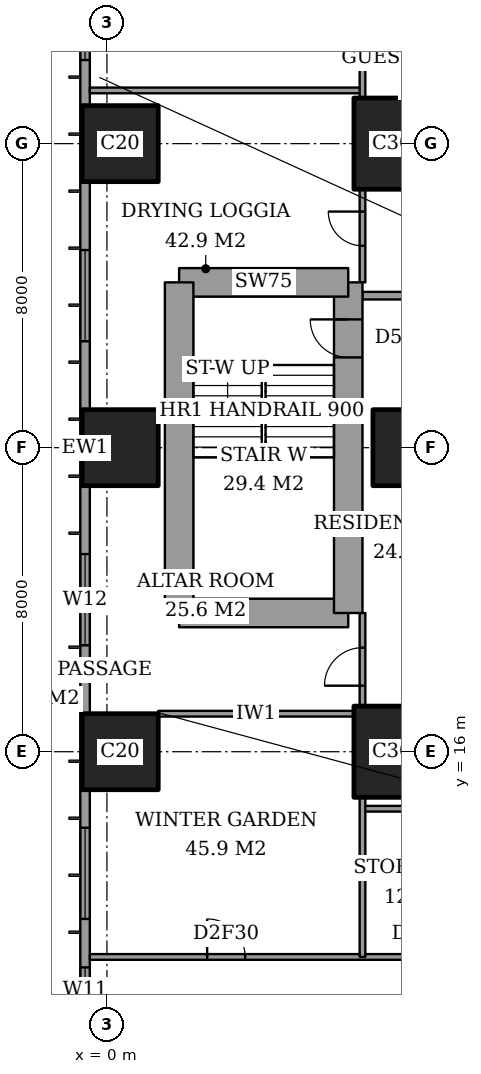
"""IFC4 building model, lengths in metres.
Left out: names, types, materials, properties, quantities, classifications, styles, units other than length and angle.
Written with IfcOpenShell. Run it as: python <this file> out.ifc"""

import sys

from ifc_helpers import new_model, si_unit, direction, frame, frame_2d, origin, origin_2d, place, context, subcontext, project, spatial, rectangle, extrude, element, fill, save


model = new_model("IFC4")
c1 = context("Model", 3, precision=1e-05, world=origin(), true_north=direction((0.0, 1.0)))
c2 = subcontext(c1, "Body", "Model", "MODEL_VIEW")
j1 = project(units=[si_unit("LENGTHUNIT", "METRE"), si_unit("PLANEANGLEUNIT", "RADIAN")], contexts=[c1])
p1 = place(None, origin())
s1 = spatial("IfcSite", under=j1, at=p1, CompositionType="ELEMENT")
p2 = place(p1, origin())
s2 = spatial("IfcBuilding", under=s1, at=p2, CompositionType="ELEMENT")
p3 = place(p2, frame((0.0, 0.0, 121.4)))
s3 = spatial("IfcBuildingStorey", under=s2, at=p3, CompositionType="ELEMENT", Elevation=121.4)
for number, where, z_axis, x_axis in (
    (1, (0.35, 16.0, 0.0), (0.0, 0.0, 1.0), (1.0, 0.0, 0.0)),
    (2, (0.35, 24.0, 0.0), (0.0, 0.0, 1.0), (1.0, 0.0, 0.0)),
    (3, (0.35, 32.0, 0.0), (0.0, 0.0, 1.0), (1.0, 0.0, 0.0)),
):
    element("IfcColumn", number, at=place(p3, frame(where, z_axis=z_axis, x_axis=x_axis)), inside=s3, PredefinedType="COLUMN", context=c2, shape_type="SweptSolid", body=[
        extrude(rectangle(XDim=2.0, YDim=2.0, at=origin_2d()), origin(), (0.0, 0.0, 1.0), 3.6),
    ])
p4 = place(p3, frame((8.0, 16.0, 0.0), z_axis=(0.0, 0.0, 1.0), x_axis=(1.0, 0.0, 0.0)))
e4 = element("IfcColumn", 4, at=p4, inside=s3, PredefinedType="COLUMN", context=c2, shape_type="SweptSolid", body=[
    extrude(rectangle(XDim=3.0, YDim=2.4, at=origin_2d()), origin(), (0.0, 0.0, 1.0), 3.6),
])
p5 = place(p3, frame((8.0, 24.0, 0.0), z_axis=(0.0, 0.0, 1.0), x_axis=(1.0, 0.0, 0.0)))
e5 = element("IfcColumn", 5, at=p5, inside=s3, PredefinedType="COLUMN", context=c2, shape_type="SweptSolid", body=[
    extrude(rectangle(XDim=2.0, YDim=2.0, at=origin_2d()), origin(), (0.0, 0.0, 1.0), 3.6),
])
p6 = place(p3, frame((8.0, 32.0, 0.0), z_axis=(0.0, 0.0, 1.0), x_axis=(1.0, 0.0, 0.0)))
e6 = element("IfcColumn", 6, at=p6, inside=s3, PredefinedType="COLUMN", context=c2, shape_type="SweptSolid", body=[
    extrude(rectangle(XDim=3.0, YDim=2.4, at=origin_2d()), origin(), (0.0, 0.0, 1.0), 3.6),
])
p7 = place(p3, frame((1.9, 19.65, 0.0), z_axis=(0.0, 0.0, 1.0), x_axis=(1.0, 0.0, 0.0)))
e7 = element("IfcWall", 7, at=p7, inside=s3, PredefinedType="SHEAR", context=c2, shape_type="SweptSolid", body=[
    extrude(rectangle(XDim=4.45, YDim=0.75, at=frame_2d((2.225, 0.0))), origin(), (0.0, 0.0, 1.0), 3.6),
])
p8 = place(p3, frame((6.35, 19.65, 0.0), z_axis=(0.0, 0.0, 1.0), x_axis=(0.0, 1.0, 0.0)))
e8 = element("IfcWall", 8, at=p8, inside=s3, PredefinedType="SHEAR", context=c2, shape_type="SweptSolid", body=[
    extrude(rectangle(XDim=8.7, YDim=0.75, at=frame_2d((4.35, 0.0))), origin(), (0.0, 0.0, 1.0), 3.6),
])
p9 = place(p8, frame((6.725, 0.0, 0.0)))
e9 = element("IfcOpeningElement", 9, at=p9, cuts=e8, PredefinedType="OPENING", context=c2, shape_type="SweptSolid", body=[
    extrude(rectangle(XDim=1.0, YDim=2.1, at=frame_2d((0.5, 1.05))), frame((0.0, 0.385, 0.0), z_axis=(0.0, -1.0, 0.0), x_axis=(1.0, 0.0, 0.0)), (0.0, 0.0, 1.0), 0.77),
])
p10 = place(p3, frame((6.35, 28.35, 0.0), z_axis=(0.0, 0.0, 1.0), x_axis=(-1.0, 0.0, 0.0)))
e10 = element("IfcWall", 10, at=p10, inside=s3, PredefinedType="SHEAR", context=c2, shape_type="SweptSolid", body=[
    extrude(rectangle(XDim=4.45, YDim=0.75, at=frame_2d((2.225, 0.0))), origin(), (0.0, 0.0, 1.0), 3.6),
])
p11 = place(p3, frame((1.9, 28.35, 0.0), z_axis=(0.0, 0.0, 1.0), x_axis=(0.0, -1.0, 0.0)))
e11 = element("IfcWall", 11, at=p11, inside=s3, PredefinedType="SHEAR", context=c2, shape_type="SweptSolid", body=[
    extrude(rectangle(XDim=8.7, YDim=0.75, at=frame_2d((4.35, 0.0))), origin(), (0.0, 0.0, 1.0), 3.6),
])
p12 = place(p3, frame((-0.575, 44.825, 0.0), z_axis=(0.0, 0.0, 1.0), x_axis=(0.0, -1.0, 0.0)))
e12 = element("IfcWall", 12, at=p12, inside=s3, PredefinedType="SOLIDWALL", context=c2, shape_type="SweptSolid", body=[
    extrude(rectangle(XDim=41.65, YDim=0.25, at=frame_2d((20.825, 0.0))), origin(), (0.0, 0.0, 1.0), 3.6),
])
p13 = place(p12, frame((0.775, 0.0, 0.4)))
e13 = element("IfcOpeningElement", 13, at=p13, cuts=e12, PredefinedType="OPENING", context=c2, shape_type="SweptSolid", body=[
    extrude(rectangle(XDim=2.4, YDim=2.2, at=frame_2d((1.2, 1.1))), frame((0.0, 0.135, 0.0), z_axis=(0.0, -1.0, 0.0), x_axis=(1.0, 0.0, 0.0)), (0.0, 0.0, 1.0), 0.27),
])
p14 = place(p12, frame((6.1, 0.0, 0.4)))
e14 = element("IfcOpeningElement", 14, at=p14, cuts=e12, PredefinedType="OPENING", context=c2, shape_type="SweptSolid", body=[
    extrude(rectangle(XDim=1.2, YDim=2.2, at=frame_2d((0.6, 1.1))), frame((0.0, 0.135, 0.0), z_axis=(0.0, -1.0, 0.0), x_axis=(1.0, 0.0, 0.0)), (0.0, 0.0, 1.0), 0.27),
])
p15 = place(p12, frame((8.225, 0.0, 0.4)))
e15 = element("IfcOpeningElement", 15, at=p15, cuts=e12, PredefinedType="OPENING", context=c2, shape_type="SweptSolid", body=[
    extrude(rectangle(XDim=2.4, YDim=2.2, at=frame_2d((1.2, 1.1))), frame((0.0, 0.135, 0.0), z_axis=(0.0, -1.0, 0.0), x_axis=(1.0, 0.0, 0.0)), (0.0, 0.0, 1.0), 0.27),
])
p16 = place(p12, frame((15.625, 0.0, 0.4)))
e16 = element("IfcOpeningElement", 16, at=p16, cuts=e12, PredefinedType="OPENING", context=c2, shape_type="SweptSolid", body=[
    extrude(rectangle(XDim=2.4, YDim=2.2, at=frame_2d((1.2, 1.1))), frame((0.0, 0.135, 0.0), z_axis=(0.0, -1.0, 0.0), x_axis=(1.0, 0.0, 0.0)), (0.0, 0.0, 1.0), 0.27),
])
p17 = place(p12, frame((23.625, 0.0, 0.4)))
e17 = element("IfcOpeningElement", 17, at=p17, cuts=e12, PredefinedType="OPENING", context=c2, shape_type="SweptSolid", body=[
    extrude(rectangle(XDim=2.4, YDim=2.2, at=frame_2d((1.2, 1.1))), frame((0.0, 0.135, 0.0), z_axis=(0.0, -1.0, 0.0), x_axis=(1.0, 0.0, 0.0)), (0.0, 0.0, 1.0), 0.27),
])
p18 = place(p12, frame((30.825, 0.0, 0.4)))
e18 = element("IfcOpeningElement", 18, at=p18, cuts=e12, PredefinedType="OPENING", context=c2, shape_type="SweptSolid", body=[
    extrude(rectangle(XDim=2.4, YDim=2.2, at=frame_2d((1.2, 1.1))), frame((0.0, 0.135, 0.0), z_axis=(0.0, -1.0, 0.0), x_axis=(1.0, 0.0, 0.0)), (0.0, 0.0, 1.0), 0.27),
])
p19 = place(p12, frame((34.5, 0.0, 0.4)))
e19 = element("IfcOpeningElement", 19, at=p19, cuts=e12, PredefinedType="OPENING", context=c2, shape_type="SweptSolid", body=[
    extrude(rectangle(XDim=1.2, YDim=2.2, at=frame_2d((0.6, 1.1))), frame((0.0, 0.135, 0.0), z_axis=(0.0, -1.0, 0.0), x_axis=(1.0, 0.0, 0.0)), (0.0, 0.0, 1.0), 0.27),
])
p20 = place(p12, frame((38.475, 0.0, 0.4)))
e20 = element("IfcOpeningElement", 20, at=p20, cuts=e12, PredefinedType="OPENING", context=c2, shape_type="SweptSolid", body=[
    extrude(rectangle(XDim=2.4, YDim=2.2, at=frame_2d((1.2, 1.1))), frame((0.0, 0.135, 0.0), z_axis=(0.0, -1.0, 0.0), x_axis=(1.0, 0.0, 0.0)), (0.0, 0.0, 1.0), 0.27),
])
p21 = place(p3, frame((-0.45, 10.6, 0.0), z_axis=(0.0, 0.0, 1.0), x_axis=(1.0, 0.0, 0.0)))
e21 = element("IfcWall", 21, at=p21, inside=s3, PredefinedType="PARTITIONING", context=c2, shape_type="SweptSolid", body=[
    extrude(rectangle(XDim=25.011, YDim=0.15, at=frame_2d((12.505, 0.0))), origin(), (0.0, 0.0, 1.0), 3.35),
])
p22 = place(p21, frame((13.25, 0.0, 0.0)))
e22 = element("IfcOpeningElement", 22, at=p22, cuts=e21, PredefinedType="OPENING", context=c2, shape_type="SweptSolid", body=[
    extrude(rectangle(XDim=1.0, YDim=2.1, at=frame_2d((0.5, 1.05))), frame((0.0, 0.085, 0.0), z_axis=(0.0, -1.0, 0.0), x_axis=(1.0, 0.0, 0.0)), (0.0, 0.0, 1.0), 0.17),
])
p23 = place(p21, frame((3.087, 0.0, 0.0)))
e23 = element("IfcOpeningElement", 23, at=p23, cuts=e21, PredefinedType="OPENING", context=c2, shape_type="SweptSolid", body=[
    extrude(rectangle(XDim=1.0, YDim=2.1, at=frame_2d((0.5, 1.05))), frame((0.0, 0.085, 0.0), z_axis=(0.0, -1.0, 0.0), x_axis=(1.0, 0.0, 0.0)), (0.0, 0.0, 1.0), 0.17),
])
p24 = place(p21, frame((8.363, 0.0, 0.0)))
e24 = element("IfcOpeningElement", 24, at=p24, cuts=e21, PredefinedType="OPENING", context=c2, shape_type="SweptSolid", body=[
    extrude(rectangle(XDim=0.9, YDim=2.1, at=frame_2d((0.45, 1.05))), frame((0.0, 0.085, 0.0), z_axis=(0.0, -1.0, 0.0), x_axis=(1.0, 0.0, 0.0)), (0.0, 0.0, 1.0), 0.17),
])
p25 = place(p21, frame((11.05, 0.0, 0.0)))
e25 = element("IfcOpeningElement", 25, at=p25, cuts=e21, PredefinedType="OPENING", context=c2, shape_type="SweptSolid", body=[
    extrude(rectangle(XDim=1.0, YDim=2.1, at=frame_2d((0.5, 1.05))), frame((0.0, 0.085, 0.0), z_axis=(0.0, -1.0, 0.0), x_axis=(1.0, 0.0, 0.0)), (0.0, 0.0, 1.0), 0.17),
])
p26 = place(p21, frame((16.15, 0.0, 0.0)))
e26 = element("IfcOpeningElement", 26, at=p26, cuts=e21, PredefinedType="OPENING", context=c2, shape_type="SweptSolid", body=[
    extrude(rectangle(XDim=1.0, YDim=2.1, at=frame_2d((0.5, 1.05))), frame((0.0, 0.085, 0.0), z_axis=(0.0, -1.0, 0.0), x_axis=(1.0, 0.0, 0.0)), (0.0, 0.0, 1.0), 0.17),
])
p27 = place(p21, frame((21.175, 0.0, 0.0)))
e27 = element("IfcOpeningElement", 27, at=p27, cuts=e21, PredefinedType="OPENING", context=c2, shape_type="SweptSolid", body=[
    extrude(rectangle(XDim=1.0, YDim=2.1, at=frame_2d((0.5, 1.05))), frame((0.0, 0.085, 0.0), z_axis=(0.0, -1.0, 0.0), x_axis=(1.0, 0.0, 0.0)), (0.0, 0.0, 1.0), 0.17),
])
p28 = place(p3, frame((6.725, 14.5, 0.0), z_axis=(0.0, 0.0, 1.0), x_axis=(1.0, 0.0, 0.0)))
e28 = element("IfcWall", 28, at=p28, inside=s3, PredefinedType="PARTITIONING", context=c2, shape_type="SweptSolid", body=[
    extrude(rectangle(XDim=3.275, YDim=0.15, at=frame_2d((1.637, 0.0))), origin(), (0.0, 0.0, 1.0), 3.35),
])
p29 = place(p3, frame((1.35, 17.0, 0.0), z_axis=(0.0, 0.0, 1.0), x_axis=(1.0, 0.0, 0.0)))
e29 = element("IfcWall", 29, at=p29, inside=s3, PredefinedType="PARTITIONING", context=c2, shape_type="SweptSolid", body=[
    extrude(rectangle(XDim=5.15, YDim=0.15, at=frame_2d((2.575, 0.0))), origin(), (0.0, 0.0, 1.0), 3.35),
])
p30 = place(p3, frame((6.725, 28.0, 0.0), z_axis=(0.0, 0.0, 1.0), x_axis=(1.0, 0.0, 0.0)))
e30 = element("IfcWall", 30, at=p30, inside=s3, PredefinedType="PARTITIONING", context=c2, shape_type="SweptSolid", body=[
    extrude(rectangle(XDim=17.275, YDim=0.2, at=frame_2d((8.637, 0.0))), origin(), (0.0, 0.0, 1.0), 3.35),
])
p31 = place(p30, frame((6.775, 0.0, 0.0)))
e31 = element("IfcOpeningElement", 31, at=p31, cuts=e30, PredefinedType="OPENING", context=c2, shape_type="SweptSolid", body=[
    extrude(rectangle(XDim=1.2, YDim=2.4, at=frame_2d((0.6, 1.2))), frame((0.0, 0.11, 0.0), z_axis=(0.0, -1.0, 0.0), x_axis=(1.0, 0.0, 0.0)), (0.0, 0.0, 1.0), 0.22),
])
p32 = place(p3, frame((-0.45, 33.4, 0.0), z_axis=(0.0, 0.0, 1.0), x_axis=(1.0, 0.0, 0.0)))
e32 = element("IfcWall", 32, at=p32, inside=s3, PredefinedType="PARTITIONING", context=c2, shape_type="SweptSolid", body=[
    extrude(rectangle(XDim=7.175, YDim=0.15, at=frame_2d((3.587, 0.0))), origin(), (0.0, 0.0, 1.0), 3.35),
])
p33 = place(p3, frame((6.725, 10.6, 0.0), z_axis=(0.0, 0.0, 1.0), x_axis=(0.0, 1.0, 0.0)))
e33 = element("IfcWall", 33, at=p33, inside=s3, PredefinedType="PARTITIONING", context=c2, shape_type="SweptSolid", body=[
    extrude(rectangle(XDim=4.2, YDim=0.15, at=frame_2d((2.1, 0.0))), origin(), (0.0, 0.0, 1.0), 3.35),
])
p34 = place(p3, frame((6.725, 17.2, 0.0), z_axis=(0.0, 0.0, 1.0), x_axis=(0.0, 1.0, 0.0)))
e34 = element("IfcWall", 34, at=p34, inside=s3, PredefinedType="PARTITIONING", context=c2, shape_type="SweptSolid", body=[
    extrude(rectangle(XDim=2.45, YDim=0.15, at=frame_2d((1.225, 0.0))), origin(), (0.0, 0.0, 1.0), 3.35),
])
p35 = place(p34, frame((0.538, 0.0, 0.0)))
e35 = element("IfcOpeningElement", 35, at=p35, cuts=e34, PredefinedType="OPENING", context=c2, shape_type="SweptSolid", body=[
    extrude(rectangle(XDim=1.0, YDim=2.1, at=frame_2d((0.5, 1.05))), frame((0.0, 0.085, 0.0), z_axis=(0.0, -1.0, 0.0), x_axis=(1.0, 0.0, 0.0)), (0.0, 0.0, 1.0), 0.17),
])
p36 = place(p3, frame((6.725, 28.35, 0.0), z_axis=(0.0, 0.0, 1.0), x_axis=(0.0, 1.0, 0.0)))
e36 = element("IfcWall", 36, at=p36, inside=s3, PredefinedType="PARTITIONING", context=c2, shape_type="SweptSolid", body=[
    extrude(rectangle(XDim=2.45, YDim=0.15, at=frame_2d((1.225, 0.0))), origin(), (0.0, 0.0, 1.0), 3.35),
])
p37 = place(p36, frame((0.962, 0.0, 0.0)))
e37 = element("IfcOpeningElement", 37, at=p37, cuts=e36, PredefinedType="OPENING", context=c2, shape_type="SweptSolid", body=[
    extrude(rectangle(XDim=0.9, YDim=2.1, at=frame_2d((0.45, 1.05))), frame((0.0, 0.085, 0.0), z_axis=(0.0, -1.0, 0.0), x_axis=(1.0, 0.0, 0.0)), (0.0, 0.0, 1.0), 0.17),
])
p38 = place(p3, frame((6.725, 33.2, 0.0), z_axis=(0.0, 0.0, 1.0), x_axis=(0.0, 1.0, 0.0)))
e38 = element("IfcWall", 38, at=p38, inside=s3, PredefinedType="PARTITIONING", context=c2, shape_type="SweptSolid", body=[
    extrude(rectangle(XDim=4.2, YDim=0.15, at=frame_2d((2.1, 0.0))), origin(), (0.0, 0.0, 1.0), 3.35),
])
p39 = place(p15, origin())
e39 = element("IfcWindow", 39, at=p39, inside=s3, PartitioningType="SINGLE_PANEL", PredefinedType="WINDOW", context=c2, shape_type="SweptSolid", body=[
    extrude(rectangle(XDim=2.4, YDim=2.2, at=frame_2d((1.2, 1.1))), frame((0.0, 0.03, 0.0), z_axis=(0.0, -1.0, 0.0), x_axis=(1.0, 0.0, 0.0)), (0.0, 0.0, 1.0), 0.06),
])
fill(e15, e39)
p40 = place(p16, origin())
e40 = element("IfcWindow", 40, at=p40, inside=s3, PartitioningType="SINGLE_PANEL", PredefinedType="WINDOW", context=c2, shape_type="SweptSolid", body=[
    extrude(rectangle(XDim=2.4, YDim=2.2, at=frame_2d((1.2, 1.1))), frame((0.0, 0.03, 0.0), z_axis=(0.0, -1.0, 0.0), x_axis=(1.0, 0.0, 0.0)), (0.0, 0.0, 1.0), 0.06),
])
fill(e16, e40)
p41 = place(p17, origin())
e41 = element("IfcWindow", 41, at=p41, inside=s3, PartitioningType="SINGLE_PANEL", PredefinedType="WINDOW", context=c2, shape_type="SweptSolid", body=[
    extrude(rectangle(XDim=2.4, YDim=2.2, at=frame_2d((1.2, 1.1))), frame((0.0, 0.03, 0.0), z_axis=(0.0, -1.0, 0.0), x_axis=(1.0, 0.0, 0.0)), (0.0, 0.0, 1.0), 0.06),
])
fill(e17, e41)
p42 = place(p18, origin())
e42 = element("IfcWindow", 42, at=p42, inside=s3, PartitioningType="SINGLE_PANEL", PredefinedType="WINDOW", context=c2, shape_type="SweptSolid", body=[
    extrude(rectangle(XDim=2.4, YDim=2.2, at=frame_2d((1.2, 1.1))), frame((0.0, 0.03, 0.0), z_axis=(0.0, -1.0, 0.0), x_axis=(1.0, 0.0, 0.0)), (0.0, 0.0, 1.0), 0.06),
])
fill(e18, e42)
p43 = place(p19, origin())
e43 = element("IfcWindow", 43, at=p43, inside=s3, PartitioningType="SINGLE_PANEL", PredefinedType="WINDOW", context=c2, shape_type="SweptSolid", body=[
    extrude(rectangle(XDim=1.2, YDim=2.2, at=frame_2d((0.6, 1.1))), frame((0.0, 0.03, 0.0), z_axis=(0.0, -1.0, 0.0), x_axis=(1.0, 0.0, 0.0)), (0.0, 0.0, 1.0), 0.06),
])
fill(e19, e43)
p44 = place(p23, origin())
e44 = element("IfcDoor", 44, at=p44, inside=s3, OperationType="SINGLE_SWING_RIGHT", PredefinedType="DOOR", context=c2, shape_type="SweptSolid", body=[
    extrude(rectangle(XDim=1.0, YDim=2.1, at=frame_2d((0.5, 1.05))), frame((0.0, 0.025, 0.0), z_axis=(0.0, -1.0, 0.0), x_axis=(1.0, 0.0, 0.0)), (0.0, 0.0, 1.0), 0.05),
])
fill(e23, e44)
p45 = place(p35, origin())
e45 = element("IfcDoor", 45, at=p45, inside=s3, OperationType="SINGLE_SWING_RIGHT", PredefinedType="DOOR", context=c2, shape_type="SweptSolid", body=[
    extrude(rectangle(XDim=1.0, YDim=2.1, at=frame_2d((0.5, 1.05))), frame((0.0, 0.025, 0.0), z_axis=(0.0, -1.0, 0.0), x_axis=(1.0, 0.0, 0.0)), (0.0, 0.0, 1.0), 0.05),
])
fill(e35, e45)
p46 = place(p37, origin())
e46 = element("IfcDoor", 46, at=p46, inside=s3, OperationType="SINGLE_SWING_LEFT", PredefinedType="DOOR", context=c2, shape_type="SweptSolid", body=[
    extrude(rectangle(XDim=0.9, YDim=2.1, at=frame_2d((0.45, 1.05))), frame((0.0, 0.025, 0.0), z_axis=(0.0, -1.0, 0.0), x_axis=(1.0, 0.0, 0.0)), (0.0, 0.0, 1.0), 0.05),
])
fill(e37, e46)
p47 = place(p9, origin())
e47 = element("IfcDoor", 47, at=p47, inside=s3, OperationType="SINGLE_SWING_LEFT", PredefinedType="DOOR", context=c2, shape_type="SweptSolid", body=[
    extrude(rectangle(XDim=1.0, YDim=2.1, at=frame_2d((0.5, 1.05))), frame((0.0, 0.025, 0.0), z_axis=(0.0, -1.0, 0.0), x_axis=(1.0, 0.0, 0.0)), (0.0, 0.0, 1.0), 0.05),
])
fill(e9, e47)
save(model, sys.argv[1])
